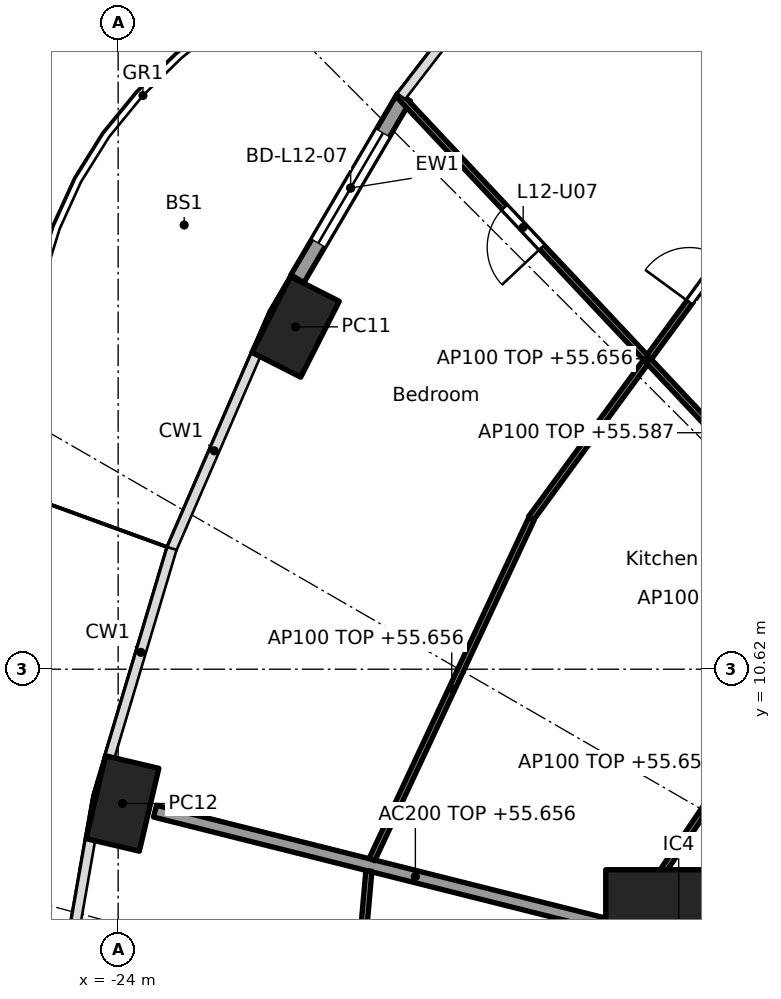
"""IFC4 building model, lengths in metres.
Left out: names, types, materials, properties, quantities, classifications, styles, units other than length and angle.
Written with IfcOpenShell. Run it as: python <this file> out.ifc"""

import sys

from ifc_helpers import new_model, si_unit, direction, frame, frame_2d, origin, origin_2d, place, context, subcontext, project, spatial, rectangle, hollow_rectangle, extrude, element, fill, save


model = new_model("IFC4")
c1 = context("Model", 3, precision=1e-05, world=origin(), true_north=direction((0.0, 1.0)))
c2 = subcontext(c1, "Body", "Model", "MODEL_VIEW")
j1 = project(units=[si_unit("LENGTHUNIT", "METRE"), si_unit("PLANEANGLEUNIT", "RADIAN")], contexts=[c1])
p1 = place(None, origin())
s1 = spatial("IfcSite", under=j1, at=p1, CompositionType="ELEMENT")
p2 = place(p1, origin())
s2 = spatial("IfcBuilding", under=s1, at=p2, CompositionType="ELEMENT")
p3 = place(p2, frame((0.0, 0.0, 52.9)))
s3 = spatial("IfcBuildingStorey", under=s2, at=p3, CompositionType="ELEMENT", Elevation=52.9)
for number, where, z_axis, x_axis in (
    (1, (-21.082, 16.25, 0.0), (0.0, 0.0, 1.0), (-0.452, -0.892, 0.0)),
    (2, (-23.929, 8.412, 0.0), (0.0, 0.0, 1.0), (-0.229, -0.973, 0.0)),
):
    element("IfcColumn", number, at=place(p3, frame(where, z_axis=z_axis, x_axis=x_axis)), inside=s3, PredefinedType="COLUMN", context=c2, shape_type="SweptSolid", body=[
        extrude(hollow_rectangle(XDim=1.4, YDim=0.9, WallThickness=0.05, at=origin_2d()), origin(), (0.0, 0.0, 1.0), 3.7),
    ])
p4 = place(p3, frame((-14.782, 6.123, 0.0), z_axis=(0.0, 0.0, 1.0), x_axis=(1.0, 0.0, 0.0)))
e3 = element("IfcColumn", 3, at=p4, inside=s3, PredefinedType="COLUMN", context=c2, shape_type="SweptSolid", body=[
    extrude(rectangle(XDim=2.4, YDim=2.4, at=origin_2d()), origin(), (0.0, 0.0, 1.0), 3.7),
])
p5 = place(p3, frame((-21.052, 17.04, 0.0), z_axis=(0.0, 0.0, 1.0), x_axis=(0.506311160839, 0.862350861546, 0.0)))
e4 = element("IfcWall", 4, at=p5, inside=s3, PredefinedType="SOLIDWALL", context=c2, shape_type="SweptSolid", body=[
    extrude(rectangle(XDim=3.462, YDim=0.25, at=frame_2d((1.731, 0.0))), origin(), (0.0, 0.0, 1.0), 3.44),
])
p6 = place(p5, frame((0.681, 0.0, 0.0)))
e5 = element("IfcOpeningElement", 5, at=p6, cuts=e4, PredefinedType="OPENING", context=c2, shape_type="SweptSolid", body=[
    extrude(rectangle(XDim=2.1, YDim=2.4, at=frame_2d((1.05, 1.2))), frame((0.0, 0.135, 0.0), z_axis=(0.0, -1.0, 0.0), x_axis=(1.0, 0.0, 0.0)), (0.0, 0.0, 1.0), 0.27),
])
p7 = place(p3, frame((-14.831, 6.135, 0.0), z_axis=(0.0, 0.0, 1.0), x_axis=(-0.969884949569, 0.243563512454, 0.0)))
e6 = element("IfcWall", 6, at=p7, inside=s3, PredefinedType="PARTITIONING", context=c2, shape_type="SweptSolid", body=[
    extrude(rectangle(XDim=8.829, YDim=0.2, at=frame_2d((4.415, 0.0))), origin(), (0.0, 0.0, 1.0), 2.756),
])
p8 = place(p3, frame((-13.362, 18.35, 0.0), z_axis=(0.0, 0.0, 1.0), x_axis=(-0.591191311491, -0.806531359104, 0.0)))
e7 = element("IfcWall", 7, at=p8, inside=s3, PredefinedType="PARTITIONING", context=c2, shape_type="SweptSolid", body=[
    extrude(rectangle(XDim=6.51, YDim=0.1, at=frame_2d((3.255, 0.0))), origin(), (0.0, 0.0, 1.0), 2.756),
])
p9 = place(p8, frame((1.202, 0.0, 0.0)))
e8 = element("IfcOpeningElement", 8, at=p9, cuts=e7, PredefinedType="OPENING", context=c2, shape_type="SweptSolid", body=[
    extrude(rectangle(XDim=0.9, YDim=2.1, at=frame_2d((0.45, 1.05))), frame((0.0, 0.06, 0.0), z_axis=(0.0, -1.0, 0.0), x_axis=(1.0, 0.0, 0.0)), (0.0, 0.0, 1.0), 0.12),
])
p10 = place(p3, frame((-8.953, 8.958, 0.0), z_axis=(0.0, 0.0, 1.0), x_axis=(-0.684574307023, 0.728943082939, 0.0)))
e9 = element("IfcWall", 9, at=p10, inside=s3, PredefinedType="PARTITIONING", context=c2, shape_type="SweptSolid", body=[
    extrude(rectangle(XDim=15.231, YDim=0.1, at=frame_2d((7.615, 0.0))), origin(), (0.0, 0.0, 1.0), 2.687),
])
p11 = place(p10, frame((1.54, 0.0, 0.0)))
e10 = element("IfcOpeningElement", 10, at=p11, cuts=e9, PredefinedType="OPENING", context=c2, shape_type="SweptSolid", body=[
    extrude(rectangle(XDim=0.9, YDim=2.1, at=frame_2d((0.45, 1.05))), frame((0.0, 0.06, 0.0), z_axis=(0.0, -1.0, 0.0), x_axis=(1.0, 0.0, 0.0)), (0.0, 0.0, 1.0), 0.12),
])
p12 = place(p10, frame((6.174, 0.0, 0.0)))
e11 = element("IfcOpeningElement", 11, at=p12, cuts=e9, PredefinedType="OPENING", context=c2, shape_type="SweptSolid", body=[
    extrude(rectangle(XDim=0.9, YDim=2.1, at=frame_2d((0.45, 1.05))), frame((0.0, 0.06, 0.0), z_axis=(0.0, -1.0, 0.0), x_axis=(1.0, 0.0, 0.0)), (0.0, 0.0, 1.0), 0.12),
])
p13 = place(p10, frame((11.8, 0.0, 0.0)))
e12 = element("IfcOpeningElement", 12, at=p13, cuts=e9, PredefinedType="OPENING", context=c2, shape_type="SweptSolid", body=[
    extrude(rectangle(XDim=0.9, YDim=2.1, at=frame_2d((0.45, 1.05))), frame((0.0, 0.06, 0.0), z_axis=(0.0, -1.0, 0.0), x_axis=(1.0, 0.0, 0.0)), (0.0, 0.0, 1.0), 0.12),
])
p14 = place(p3, frame((-13.162, 10.087, 0.0), z_axis=(0.0, 0.0, 1.0), x_axis=(-0.55912750241, -0.829081682375, 0.0)))
e13 = element("IfcWall", 13, at=p14, inside=s3, PredefinedType="PARTITIONING", context=c2, shape_type="SweptSolid", body=[
    extrude(rectangle(XDim=4.408, YDim=0.1, at=frame_2d((2.204, 0.0))), origin(), (0.0, 0.0, 1.0), 2.756),
])
p15 = place(p3, frame((-17.203, 13.095, 0.0), z_axis=(0.0, 0.0, 1.0), x_axis=(-0.423926333401, -0.905696673202, 0.0)))
e14 = element("IfcWall", 14, at=p15, inside=s3, PredefinedType="PARTITIONING", context=c2, shape_type="SweptSolid", body=[
    extrude(rectangle(XDim=6.188, YDim=0.1, at=frame_2d((3.094, 0.0))), origin(), (0.0, 0.0, 1.0), 2.756),
])
p16 = place(p3, frame((-19.877, 7.301, 0.0), z_axis=(0.0, 0.0, 1.0), x_axis=(-0.088143415068, -0.996107794558, 0.0)))
e15 = element("IfcWall", 15, at=p16, inside=s3, PredefinedType="PARTITIONING", context=c2, shape_type="SweptSolid", body=[
    extrude(rectangle(XDim=7.279, YDim=0.1, at=frame_2d((3.64, 0.0))), origin(), (0.0, 0.0, 1.0), 2.756),
])
p17 = place(p16, frame((3.189, 0.0, 0.0)))
e16 = element("IfcOpeningElement", 16, at=p17, cuts=e15, PredefinedType="OPENING", context=c2, shape_type="SweptSolid", body=[
    extrude(rectangle(XDim=0.9, YDim=2.1, at=frame_2d((0.45, 1.05))), frame((0.0, 0.06, 0.0), z_axis=(0.0, -1.0, 0.0), x_axis=(1.0, 0.0, 0.0)), (0.0, 0.0, 1.0), 0.12),
])
p18 = place(p6, origin())
e17 = element("IfcDoor", 17, at=p18, inside=s3, OperationType="SLIDING_TO_LEFT", PredefinedType="DOOR", context=c2, shape_type="SweptSolid", body=[
    extrude(rectangle(XDim=2.1, YDim=2.4, at=frame_2d((1.05, 1.2))), frame((0.0, 0.025, 0.0), z_axis=(0.0, -1.0, 0.0), x_axis=(1.0, 0.0, 0.0)), (0.0, 0.0, 1.0), 0.05),
])
fill(e5, e17)
p19 = place(p9, frame((0.9, 0.0, 0.0), x_axis=(-1.0, 0.0, 0.0)))
e18 = element("IfcDoor", 18, at=p19, inside=s3, OperationType="SINGLE_SWING_LEFT", PredefinedType="DOOR", context=c2, shape_type="SweptSolid", body=[
    extrude(rectangle(XDim=0.9, YDim=2.1, at=frame_2d((0.45, 1.05))), frame((0.0, 0.025, 0.0), z_axis=(0.0, -1.0, 0.0), x_axis=(1.0, 0.0, 0.0)), (0.0, 0.0, 1.0), 0.05),
])
fill(e8, e18)
p20 = place(p13, origin())
e19 = element("IfcDoor", 19, at=p20, inside=s3, OperationType="SINGLE_SWING_LEFT", PredefinedType="DOOR", context=c2, shape_type="SweptSolid", body=[
    extrude(rectangle(XDim=0.9, YDim=2.1, at=frame_2d((0.45, 1.05))), frame((0.0, 0.025, 0.0), z_axis=(0.0, -1.0, 0.0), x_axis=(1.0, 0.0, 0.0)), (0.0, 0.0, 1.0), 0.05),
])
fill(e12, e19)
save(model, sys.argv[1])
